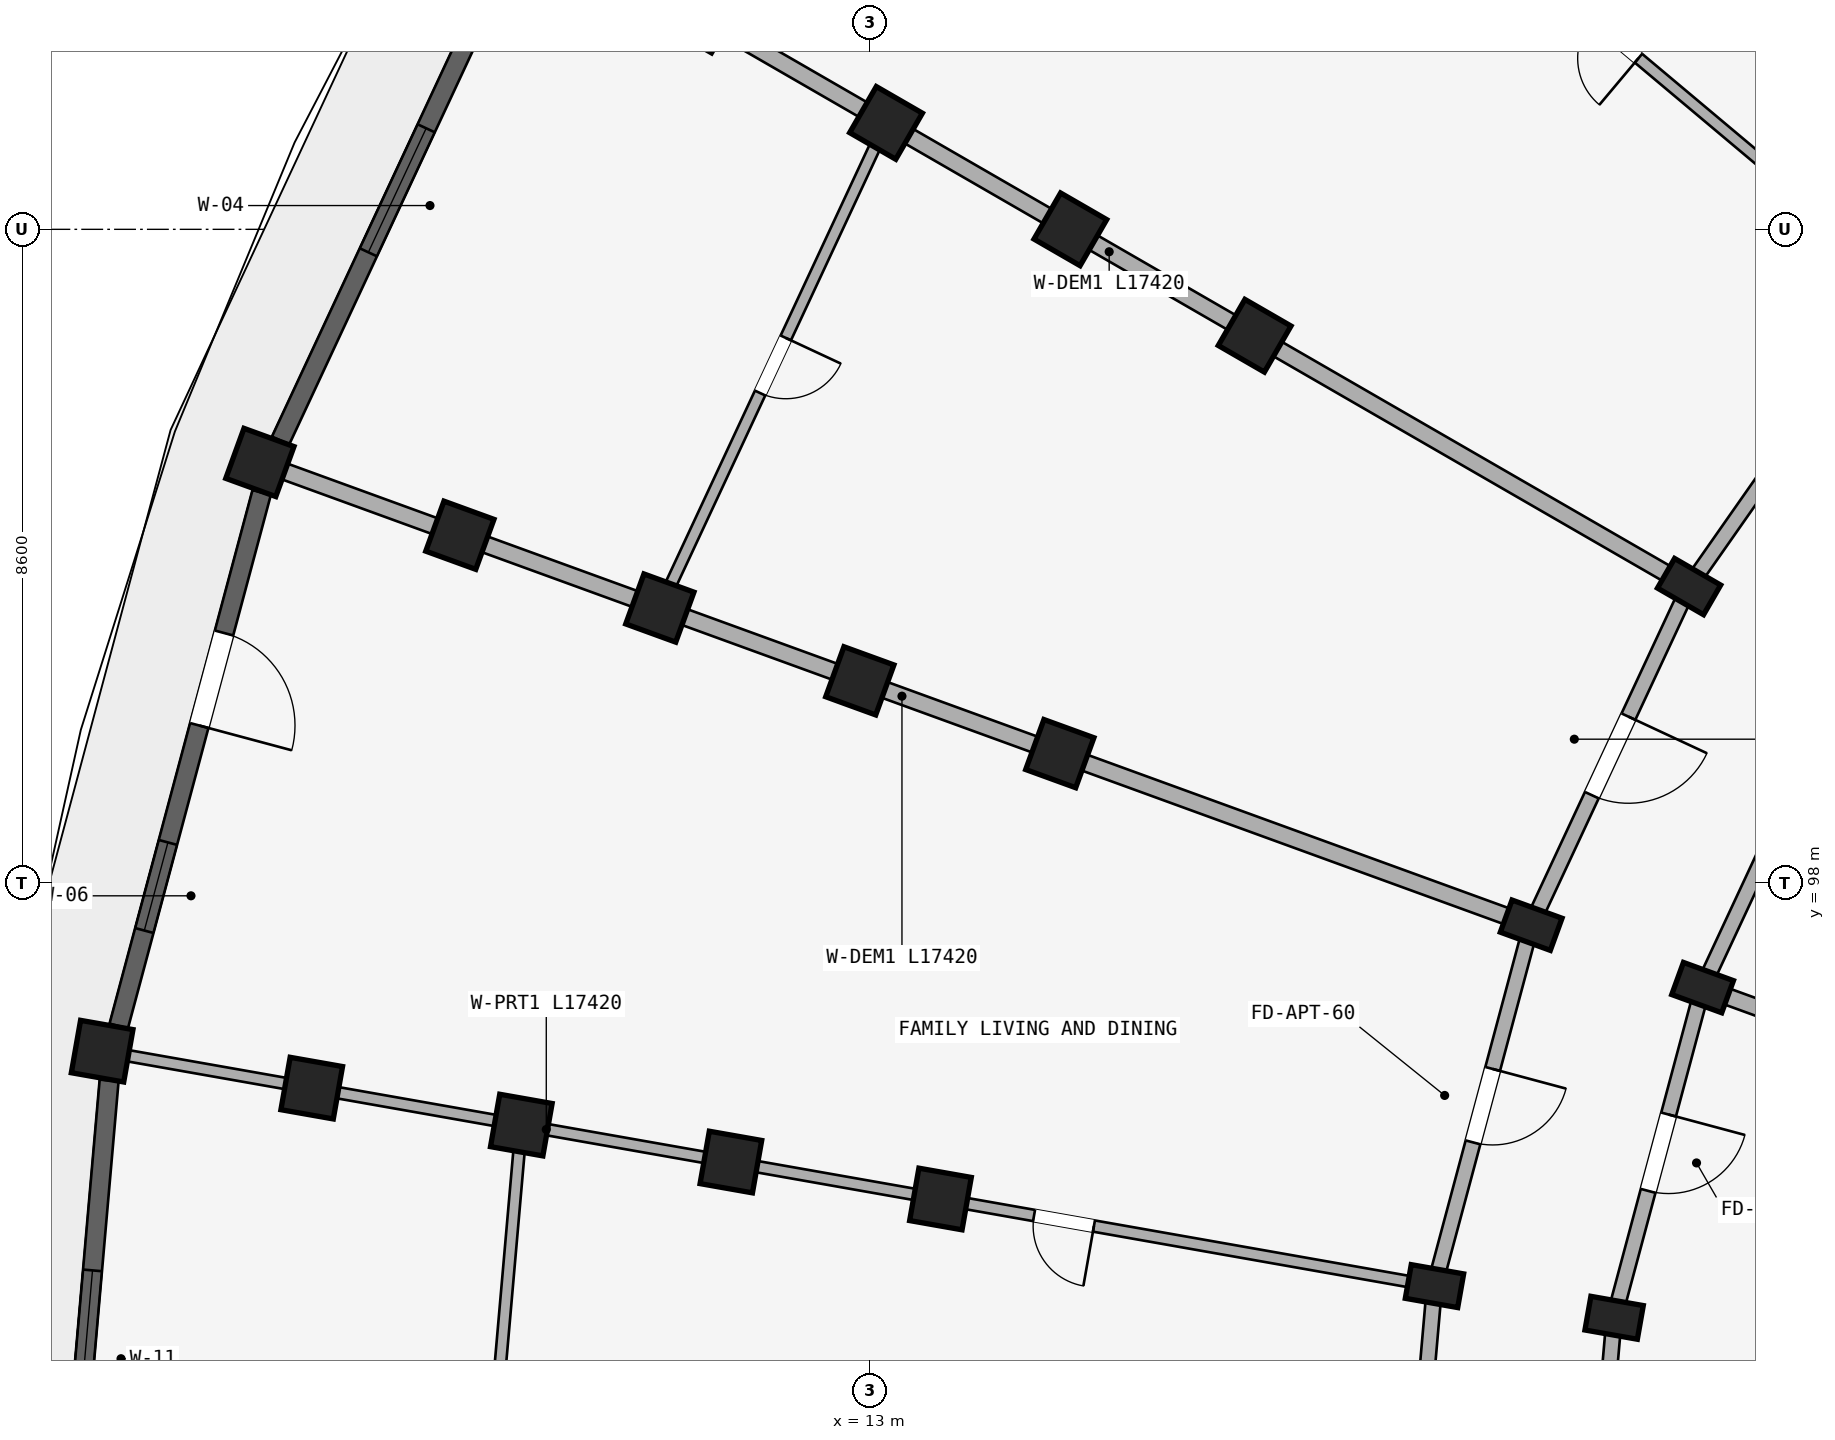
"""IFC4 building model, lengths in metres.
Left out: names, types, materials, properties, quantities, classifications, styles, units other than length and angle.
Written with IfcOpenShell. Run it as: python <this file> out.ifc"""

import sys

from ifc_helpers import new_model, si_unit, direction, frame, frame_2d, origin, origin_2d, place, context, subcontext, project, spatial, rectangle, extrude, element, fill, save


model = new_model("IFC4")
c1 = context("Model", 3, precision=1e-05, world=origin(), true_north=direction((0.0, 1.0)))
c2 = subcontext(c1, "Body", "Model", "MODEL_VIEW")
j1 = project(units=[si_unit("LENGTHUNIT", "METRE"), si_unit("PLANEANGLEUNIT", "RADIAN")], contexts=[c1])
p1 = place(None, origin())
s1 = spatial("IfcSite", under=j1, at=p1, CompositionType="ELEMENT")
p2 = place(p1, origin())
s2 = spatial("IfcBuilding", under=s1, at=p2, CompositionType="ELEMENT")
p3 = place(p2, frame((0.0, 0.0, 21.3)))
s3 = spatial("IfcBuildingStorey", under=s2, at=p3, CompositionType="ELEMENT", Elevation=21.3)
p4 = place(p3, frame((23.778, 101.9, 0.0), z_axis=(0.0, 0.0, 1.0), x_axis=(0.5, 0.866025403784, 0.0)))
e1 = element("IfcColumn", 1, at=p4, inside=s3, PredefinedType="COLUMN", context=c2, shape_type="SweptSolid", body=[
    extrude(rectangle(XDim=0.45, YDim=0.7, at=origin_2d()), origin(), (0.0, 0.0, 1.0), 2.93),
])
for number, where, z_axis, x_axis in (
    (2, (18.062, 105.2, 0.0), (0.0, 0.0, 1.0), (0.5, 0.866, 0.0)),
    (3, (15.637, 106.6, 0.0), (0.0, 0.0, 1.0), (0.5, 0.866, 0.0)),
    (4, (13.213, 108.0, 0.0), (0.0, 0.0, 1.0), (0.5, 0.866, 0.0)),
    (5, (10.788, 109.4, 0.0), (0.0, 0.0, 1.0), (0.5, 0.866, 0.0)),
):
    element("IfcColumn", number, at=place(p3, frame(where, z_axis=z_axis, x_axis=x_axis)), inside=s3, PredefinedType="COLUMN", context=c2, shape_type="SweptSolid", body=[
        extrude(rectangle(XDim=0.7, YDim=0.7, at=origin_2d()), origin(), (0.0, 0.0, 1.0), 2.93),
    ])
for number, where, z_axis, x_axis in (
    (6, (23.956, 96.624, 0.0), (0.0, 0.0, 1.0), (0.342, 0.94, 0.0)),
    (7, (21.701, 97.445, 0.0), (0.0, 0.0, 1.0), (0.342, 0.94, 0.0)),
):
    element("IfcColumn", number, at=place(p3, frame(where, z_axis=z_axis, x_axis=x_axis)), inside=s3, PredefinedType="COLUMN", context=c2, shape_type="SweptSolid", body=[
        extrude(rectangle(XDim=0.45, YDim=0.7, at=origin_2d()), origin(), (0.0, 0.0, 1.0), 2.93),
    ])
for number, where, z_axis, x_axis in (
    (8, (15.499, 99.702, 0.0), (0.0, 0.0, 1.0), (0.342, 0.94, 0.0)),
    (9, (12.868, 100.66, 0.0), (0.0, 0.0, 1.0), (0.342, 0.94, 0.0)),
    (10, (10.236, 101.618, 0.0), (0.0, 0.0, 1.0), (0.342, 0.94, 0.0)),
    (11, (7.605, 102.575, 0.0), (0.0, 0.0, 1.0), (0.342, 0.94, 0.0)),
    (12, (4.974, 103.533, 0.0), (0.0, 0.0, 1.0), (0.342, 0.94, 0.0)),
):
    element("IfcColumn", number, at=place(p3, frame(where, z_axis=z_axis, x_axis=x_axis)), inside=s3, PredefinedType="COLUMN", context=c2, shape_type="SweptSolid", body=[
        extrude(rectangle(XDim=0.7, YDim=0.7, at=origin_2d()), origin(), (0.0, 0.0, 1.0), 2.93),
    ])
for number, where, z_axis, x_axis in (
    (13, (22.792, 92.28, 0.0), (0.0, 0.0, 1.0), (0.174, 0.985, 0.0)),
    (14, (20.428, 92.697, 0.0), (0.0, 0.0, 1.0), (0.174, 0.985, 0.0)),
):
    element("IfcColumn", number, at=place(p3, frame(where, z_axis=z_axis, x_axis=x_axis)), inside=s3, PredefinedType="COLUMN", context=c2, shape_type="SweptSolid", body=[
        extrude(rectangle(XDim=0.45, YDim=0.7, at=origin_2d()), origin(), (0.0, 0.0, 1.0), 2.93),
    ])
for number, where, z_axis, x_axis in (
    (15, (13.929, 93.843, 0.0), (0.0, 0.0, 1.0), (0.174, 0.985, 0.0)),
    (16, (11.171, 94.329, 0.0), (0.0, 0.0, 1.0), (0.174, 0.985, 0.0)),
    (17, (8.414, 94.815, 0.0), (0.0, 0.0, 1.0), (0.174, 0.985, 0.0)),
    (18, (5.656, 95.302, 0.0), (0.0, 0.0, 1.0), (0.174, 0.985, 0.0)),
    (19, (2.899, 95.788, 0.0), (0.0, 0.0, 1.0), (0.174, 0.985, 0.0)),
):
    element("IfcColumn", number, at=place(p3, frame(where, z_axis=z_axis, x_axis=x_axis)), inside=s3, PredefinedType="COLUMN", context=c2, shape_type="SweptSolid", body=[
        extrude(rectangle(XDim=0.7, YDim=0.7, at=origin_2d()), origin(), (0.0, 0.0, 1.0), 2.93),
    ])
p5 = place(p3, frame((26.598, 105.927, 0.0), z_axis=(0.0, 0.0, 1.0), x_axis=(-0.573592335331, -0.819140911474, 0.0)))
e20 = element("IfcWall", 20, at=p5, inside=s3, PredefinedType="STANDARD", context=c2, shape_type="SweptSolid", body=[
    extrude(rectangle(XDim=4.916, YDim=0.2, at=frame_2d((2.458, 0.0))), origin(), (0.0, 0.0, 1.0), 2.372),
])
p6 = place(p3, frame((25.856, 100.7, 0.0), z_axis=(0.0, 0.0, 1.0), x_axis=(-0.422617978463, -0.906307919131, 0.0)))
e21 = element("IfcWall", 21, at=p6, inside=s3, PredefinedType="STANDARD", context=c2, shape_type="SweptSolid", body=[
    extrude(rectangle(XDim=4.497, YDim=0.2, at=frame_2d((2.249, 0.0))), origin(), (0.0, 0.0, 1.0), 2.372),
])
p7 = place(p3, frame((23.778, 101.9, 0.0), z_axis=(0.0, 0.0, 1.0), x_axis=(-0.422629854778, -0.906302381024, 0.0)))
e22 = element("IfcWall", 22, at=p7, inside=s3, PredefinedType="STANDARD", context=c2, shape_type="SweptSolid", body=[
    extrude(rectangle(XDim=4.915, YDim=0.2, at=frame_2d((2.458, 0.0))), origin(), (0.0, 0.0, 1.0), 2.372),
])
p8 = place(p7, frame((1.888, 0.0, 0.0)))
e23 = element("IfcOpeningElement", 23, at=p8, cuts=e22, PredefinedType="OPENING", context=c2, shape_type="SweptSolid", body=[
    extrude(rectangle(XDim=1.14, YDim=2.15, at=frame_2d((0.57, 1.075))), frame((0.0, 0.11, 0.0), z_axis=(0.0, -1.0, 0.0), x_axis=(1.0, 0.0, 0.0)), (0.0, 0.0, 1.0), 0.22),
])
p9 = place(p3, frame((23.956, 96.624, 0.0), z_axis=(0.0, 0.0, 1.0), x_axis=(-0.258787642463, -0.965934240054, 0.0)))
e24 = element("IfcWall", 24, at=p9, inside=s3, PredefinedType="STANDARD", context=c2, shape_type="SweptSolid", body=[
    extrude(rectangle(XDim=4.497, YDim=0.2, at=frame_2d((2.249, 0.0))), origin(), (0.0, 0.0, 1.0), 2.372),
])
p10 = place(p9, frame((1.729, 0.0, 0.0)))
e25 = element("IfcOpeningElement", 25, at=p10, cuts=e24, PredefinedType="OPENING", context=c2, shape_type="SweptSolid", body=[
    extrude(rectangle(XDim=1.04, YDim=2.15, at=frame_2d((0.52, 1.075))), frame((0.0, 0.11, 0.0), z_axis=(0.0, -1.0, 0.0), x_axis=(1.0, 0.0, 0.0)), (0.0, 0.0, 1.0), 0.22),
])
p11 = place(p3, frame((21.701, 97.445, 0.0), z_axis=(0.0, 0.0, 1.0), x_axis=(-0.258803112091, -0.965930095386, 0.0)))
e26 = element("IfcWall", 26, at=p11, inside=s3, PredefinedType="STANDARD", context=c2, shape_type="SweptSolid", body=[
    extrude(rectangle(XDim=4.916, YDim=0.2, at=frame_2d((2.458, 0.0))), origin(), (0.0, 0.0, 1.0), 2.372),
])
p12 = place(p11, frame((1.958, 0.0, 0.0)))
e27 = element("IfcOpeningElement", 27, at=p12, cuts=e26, PredefinedType="OPENING", context=c2, shape_type="SweptSolid", body=[
    extrude(rectangle(XDim=1.0, YDim=2.15, at=frame_2d((0.5, 1.075))), frame((0.0, 0.11, 0.0), z_axis=(0.0, -1.0, 0.0), x_axis=(1.0, 0.0, 0.0)), (0.0, 0.0, 1.0), 0.22),
])
p13 = place(p3, frame((22.792, 92.28, 0.0), z_axis=(0.0, 0.0, 1.0), x_axis=(-0.087187153726, -0.996191949488, 0.0)))
e28 = element("IfcWall", 28, at=p13, inside=s3, PredefinedType="STANDARD", context=c2, shape_type="SweptSolid", body=[
    extrude(rectangle(XDim=4.497, YDim=0.2, at=frame_2d((2.249, 0.0))), origin(), (0.0, 0.0, 1.0), 2.372),
])
p14 = place(p3, frame((20.428, 92.697, 0.0), z_axis=(0.0, 0.0, 1.0), x_axis=(-0.087167566415, -0.996193663584, 0.0)))
e29 = element("IfcWall", 29, at=p14, inside=s3, PredefinedType="STANDARD", context=c2, shape_type="SweptSolid", body=[
    extrude(rectangle(XDim=4.916, YDim=0.2, at=frame_2d((2.458, 0.0))), origin(), (0.0, 0.0, 1.0), 2.372),
])
p15 = place(p3, frame((26.521, 105.991, 0.0), z_axis=(0.0, 0.0, 1.0), x_axis=(-0.766046835987, 0.642784757967, 0.0)))
e30 = element("IfcWall", 30, at=p15, inside=s3, PredefinedType="PARTITIONING", context=c2, shape_type="SweptSolid", body=[
    extrude(rectangle(XDim=17.42, YDim=0.15, at=frame_2d((8.71, 0.0))), origin(), (0.0, 0.0, 1.0), 2.372),
])
p16 = place(p15, frame((4.45, 0.0, 0.0)))
e31 = element("IfcOpeningElement", 31, at=p16, cuts=e30, PredefinedType="OPENING", context=c2, shape_type="SweptSolid", body=[
    extrude(rectangle(XDim=0.8, YDim=2.1, at=frame_2d((0.4, 1.05))), frame((0.0, 0.085, 0.0), z_axis=(0.0, -1.0, 0.0), x_axis=(1.0, 0.0, 0.0)), (0.0, 0.0, 1.0), 0.17),
])
p17 = place(p3, frame((23.691, 101.95, 0.0), z_axis=(0.0, 0.0, 1.0), x_axis=(-0.866026648973, 0.499997843263, 0.0)))
e32 = element("IfcWall", 32, at=p17, inside=s3, PredefinedType="STANDARD", context=c2, shape_type="SweptSolid", body=[
    extrude(rectangle(XDim=17.42, YDim=0.22, at=frame_2d((8.71, 0.0))), origin(), (0.0, 0.0, 1.0), 2.372),
])
p18 = place(p3, frame((30.346, 94.298, 0.0), z_axis=(0.0, 0.0, 1.0), x_axis=(-0.939696231917, 0.342010221662, 0.0)))
e33 = element("IfcWall", 33, at=p18, inside=s3, PredefinedType="STANDARD", context=c2, shape_type="SweptSolid", body=[
    extrude(rectangle(XDim=6.75, YDim=0.22, at=frame_2d((3.375, 0.0))), origin(), (0.0, 0.0, 1.0), 2.372),
])
p19 = place(p3, frame((21.607, 97.479, 0.0), z_axis=(0.0, 0.0, 1.0), x_axis=(-0.939691901159, 0.342022120477, 0.0)))
e34 = element("IfcWall", 34, at=p19, inside=s3, PredefinedType="STANDARD", context=c2, shape_type="SweptSolid", body=[
    extrude(rectangle(XDim=17.42, YDim=0.22, at=frame_2d((8.71, 0.0))), origin(), (0.0, 0.0, 1.0), 2.372),
])
p20 = place(p3, frame((20.33, 92.714, 0.0), z_axis=(0.0, 0.0, 1.0), x_axis=(-0.984808098809, 0.173646216546, 0.0)))
e35 = element("IfcWall", 35, at=p20, inside=s3, PredefinedType="PARTITIONING", context=c2, shape_type="SweptSolid", body=[
    extrude(rectangle(XDim=17.42, YDim=0.15, at=frame_2d((8.71, 0.0))), origin(), (0.0, 0.0, 1.0), 2.372),
])
p21 = place(p20, frame((4.45, 0.0, 0.0)))
e36 = element("IfcOpeningElement", 36, at=p21, cuts=e35, PredefinedType="OPENING", context=c2, shape_type="SweptSolid", body=[
    extrude(rectangle(XDim=0.8, YDim=2.1, at=frame_2d((0.4, 1.05))), frame((0.0, 0.085, 0.0), z_axis=(0.0, -1.0, 0.0), x_axis=(1.0, 0.0, 0.0)), (0.0, 0.0, 1.0), 0.17),
])
p22 = place(p3, frame((13.213, 108.0, 0.0), z_axis=(0.0, 0.0, 1.0), x_axis=(-0.422640621205, -0.906297360311, 0.0)))
e37 = element("IfcWall", 37, at=p22, inside=s3, PredefinedType="PLUMBINGWALL", context=c2, shape_type="SweptSolid", body=[
    extrude(rectangle(XDim=7.042, YDim=0.15, at=frame_2d((3.521, 0.0))), origin(), (0.0, 0.0, 1.0), 2.372),
])
p23 = place(p22, frame((3.121, 0.0, 0.0)))
e38 = element("IfcOpeningElement", 38, at=p23, cuts=e37, PredefinedType="OPENING", context=c2, shape_type="SweptSolid", body=[
    extrude(rectangle(XDim=0.8, YDim=2.1, at=frame_2d((0.4, 1.05))), frame((0.0, 0.085, 0.0), z_axis=(0.0, -1.0, 0.0), x_axis=(1.0, 0.0, 0.0)), (0.0, 0.0, 1.0), 0.17),
])
p24 = place(p3, frame((8.414, 94.815, 0.0), z_axis=(0.0, 0.0, 1.0), x_axis=(-0.087156198737, -0.996194658198, 0.0)))
e39 = element("IfcWall", 39, at=p24, inside=s3, PredefinedType="PLUMBINGWALL", context=c2, shape_type="SweptSolid", body=[
    extrude(rectangle(XDim=7.042, YDim=0.15, at=frame_2d((3.521, 0.0))), origin(), (0.0, 0.0, 1.0), 2.372),
])
p25 = place(p24, frame((3.141, 0.0, 0.0)))
e40 = element("IfcOpeningElement", 40, at=p25, cuts=e39, PredefinedType="OPENING", context=c2, shape_type="SweptSolid", body=[
    extrude(rectangle(XDim=0.76, YDim=2.05, at=frame_2d((0.38, 1.025))), frame((0.0, 0.085, 0.0), z_axis=(0.0, -1.0, 0.0), x_axis=(1.0, 0.0, 0.0)), (0.0, 0.0, 1.0), 0.17),
])
p26 = place(p3, frame((8.317, 110.406, 0.0), z_axis=(0.0, 0.0, 1.0), x_axis=(-0.422627946127, -0.90630327107, 0.0)))
e41 = element("IfcWall", 41, at=p26, inside=s3, PredefinedType="STANDARD", context=c2, shape_type="SweptSolid", body=[
    extrude(rectangle(XDim=7.267, YDim=0.25, at=frame_2d((3.633, 0.0))), origin(), (0.0, 0.0, 1.0), 2.472),
])
p27 = place(p26, frame((2.733, 0.0, 0.622)))
e42 = element("IfcOpeningElement", 42, at=p27, cuts=e41, PredefinedType="OPENING", context=c2, shape_type="SweptSolid", body=[
    extrude(rectangle(XDim=1.8, YDim=1.65, at=frame_2d((0.9, 0.825))), frame((0.0, 0.135, 0.0), z_axis=(0.0, -1.0, 0.0), x_axis=(1.0, 0.0, 0.0)), (0.0, 0.0, 1.0), 0.27),
])
p28 = place(p3, frame((4.998, 103.137, 0.0), z_axis=(0.0, 0.0, 1.0), x_axis=(-0.258802140196, -0.965930355787, 0.0)))
e43 = element("IfcWall", 43, at=p28, inside=s3, PredefinedType="STANDARD", context=c2, shape_type="SweptSolid", body=[
    extrude(rectangle(XDim=7.267, YDim=0.25, at=frame_2d((3.633, 0.0))), origin(), (0.0, 0.0, 1.0), 2.472),
])
p29 = place(p28, frame((4.766, 0.0, 0.522)))
e44 = element("IfcOpeningElement", 44, at=p29, cuts=e43, PredefinedType="OPENING", context=c2, shape_type="SweptSolid", body=[
    extrude(rectangle(XDim=1.2, YDim=1.5, at=frame_2d((0.6, 0.75))), frame((0.0, 0.135, 0.0), z_axis=(0.0, -1.0, 0.0), x_axis=(1.0, 0.0, 0.0)), (0.0, 0.0, 1.0), 0.27),
])
p30 = place(p28, frame((1.913, 0.0, 0.0)))
e45 = element("IfcOpeningElement", 45, at=p30, cuts=e43, PredefinedType="OPENING", context=c2, shape_type="SweptSolid", body=[
    extrude(rectangle(XDim=1.26, YDim=2.15, at=frame_2d((0.63, 1.075))), frame((0.0, 0.135, 0.0), z_axis=(0.0, -1.0, 0.0), x_axis=(1.0, 0.0, 0.0)), (0.0, 0.0, 1.0), 0.27),
])
p31 = place(p3, frame((2.991, 95.403, 0.0), z_axis=(0.0, 0.0, 1.0), x_axis=(-0.08718487158, -0.99619214922, 0.0)))
e46 = element("IfcWall", 46, at=p31, inside=s3, PredefinedType="STANDARD", context=c2, shape_type="SweptSolid", body=[
    extrude(rectangle(XDim=7.267, YDim=0.25, at=frame_2d((3.633, 0.0))), origin(), (0.0, 0.0, 1.0), 2.472),
])
p32 = place(p31, frame((2.508, 0.0, 0.322)))
e47 = element("IfcOpeningElement", 47, at=p32, cuts=e46, PredefinedType="OPENING", context=c2, shape_type="SweptSolid", body=[
    extrude(rectangle(XDim=2.25, YDim=1.95, at=frame_2d((1.125, 0.975))), frame((0.0, 0.135, 0.0), z_axis=(0.0, -1.0, 0.0), x_axis=(1.0, 0.0, 0.0)), (0.0, 0.0, 1.0), 0.27),
])
p33 = place(p27, origin())
e48 = element("IfcWindow", 48, at=p33, inside=s3, PartitioningType="DOUBLE_PANEL_VERTICAL", PredefinedType="WINDOW", context=c2, shape_type="SweptSolid", body=[
    extrude(rectangle(XDim=1.8, YDim=1.65, at=frame_2d((0.9, 0.825))), frame((0.0, 0.03, 0.0), z_axis=(0.0, -1.0, 0.0), x_axis=(1.0, 0.0, 0.0)), (0.0, 0.0, 1.0), 0.06),
])
fill(e42, e48)
p34 = place(p29, origin())
e49 = element("IfcWindow", 49, at=p34, inside=s3, PartitioningType="SINGLE_PANEL", PredefinedType="WINDOW", context=c2, shape_type="SweptSolid", body=[
    extrude(rectangle(XDim=1.2, YDim=1.5, at=frame_2d((0.6, 0.75))), frame((0.0, 0.03, 0.0), z_axis=(0.0, -1.0, 0.0), x_axis=(1.0, 0.0, 0.0)), (0.0, 0.0, 1.0), 0.06),
])
fill(e44, e49)
p35 = place(p32, origin())
e50 = element("IfcWindow", 50, at=p35, inside=s3, PartitioningType="TRIPLE_PANEL_VERTICAL", PredefinedType="WINDOW", context=c2, shape_type="SweptSolid", body=[
    extrude(rectangle(XDim=2.25, YDim=1.95, at=frame_2d((1.125, 0.975))), frame((0.0, 0.03, 0.0), z_axis=(0.0, -1.0, 0.0), x_axis=(1.0, 0.0, 0.0)), (0.0, 0.0, 1.0), 0.06),
])
fill(e47, e50)
p36 = place(p16, origin())
e51 = element("IfcDoor", 51, at=p36, inside=s3, OperationType="SINGLE_SWING_LEFT", PredefinedType="DOOR", context=c2, shape_type="SweptSolid", body=[
    extrude(rectangle(XDim=0.8, YDim=2.1, at=frame_2d((0.4, 1.05))), frame((0.0, 0.025, 0.0), z_axis=(0.0, -1.0, 0.0), x_axis=(1.0, 0.0, 0.0)), (0.0, 0.0, 1.0), 0.05),
])
fill(e31, e51)
p37 = place(p21, frame((0.8, 0.0, 0.0), z_axis=(0.0, 0.0, 1.0), x_axis=(-1.0, 0.0, 0.0)))
e52 = element("IfcDoor", 52, at=p37, inside=s3, OperationType="SINGLE_SWING_RIGHT", PredefinedType="DOOR", context=c2, shape_type="SweptSolid", body=[
    extrude(rectangle(XDim=0.8, YDim=2.1, at=frame_2d((0.4, 1.05))), frame((0.0, 0.025, 0.0), z_axis=(0.0, -1.0, 0.0), x_axis=(1.0, 0.0, 0.0)), (0.0, 0.0, 1.0), 0.05),
])
fill(e36, e52)
p38 = place(p8, origin())
e53 = element("IfcDoor", 53, at=p38, inside=s3, OperationType="SINGLE_SWING_LEFT", PredefinedType="DOOR", context=c2, shape_type="SweptSolid", body=[
    extrude(rectangle(XDim=1.14, YDim=2.15, at=frame_2d((0.57, 1.075))), frame((0.0, 0.025, 0.0), z_axis=(0.0, -1.0, 0.0), x_axis=(1.0, 0.0, 0.0)), (0.0, 0.0, 1.0), 0.05),
])
fill(e23, e53)
p39 = place(p23, frame((0.8, 0.0, 0.0), z_axis=(0.0, 0.0, 1.0), x_axis=(-1.0, 0.0, 0.0)))
e54 = element("IfcDoor", 54, at=p39, inside=s3, OperationType="SINGLE_SWING_RIGHT", PredefinedType="DOOR", context=c2, shape_type="SweptSolid", body=[
    extrude(rectangle(XDim=0.8, YDim=2.1, at=frame_2d((0.4, 1.05))), frame((0.0, 0.025, 0.0), z_axis=(0.0, -1.0, 0.0), x_axis=(1.0, 0.0, 0.0)), (0.0, 0.0, 1.0), 0.05),
])
fill(e38, e54)
p40 = place(p12, origin())
e55 = element("IfcDoor", 55, at=p40, inside=s3, OperationType="SINGLE_SWING_LEFT", PredefinedType="DOOR", context=c2, shape_type="SweptSolid", body=[
    extrude(rectangle(XDim=1.0, YDim=2.15, at=frame_2d((0.5, 1.075))), frame((0.0, 0.025, 0.0), z_axis=(0.0, -1.0, 0.0), x_axis=(1.0, 0.0, 0.0)), (0.0, 0.0, 1.0), 0.05),
])
fill(e27, e55)
p41 = place(p10, frame((1.04, 0.0, 0.0), z_axis=(0.0, 0.0, 1.0), x_axis=(-1.0, 0.0, 0.0)))
e56 = element("IfcDoor", 56, at=p41, inside=s3, OperationType="SINGLE_SWING_RIGHT", PredefinedType="DOOR", context=c2, shape_type="SweptSolid", body=[
    extrude(rectangle(XDim=1.04, YDim=2.15, at=frame_2d((0.52, 1.075))), frame((0.0, 0.025, 0.0), z_axis=(0.0, -1.0, 0.0), x_axis=(1.0, 0.0, 0.0)), (0.0, 0.0, 1.0), 0.05),
])
fill(e25, e56)
p42 = place(p30, frame((1.26, 0.0, 0.0), z_axis=(0.0, 0.0, 1.0), x_axis=(-1.0, 0.0, 0.0)))
e57 = element("IfcDoor", 57, at=p42, inside=s3, OperationType="SINGLE_SWING_LEFT", PredefinedType="DOOR", context=c2, shape_type="SweptSolid", body=[
    extrude(rectangle(XDim=1.26, YDim=2.15, at=frame_2d((0.63, 1.075))), frame((0.0, 0.025, 0.0), z_axis=(0.0, -1.0, 0.0), x_axis=(1.0, 0.0, 0.0)), (0.0, 0.0, 1.0), 0.05),
])
fill(e45, e57)
save(model, sys.argv[1])
